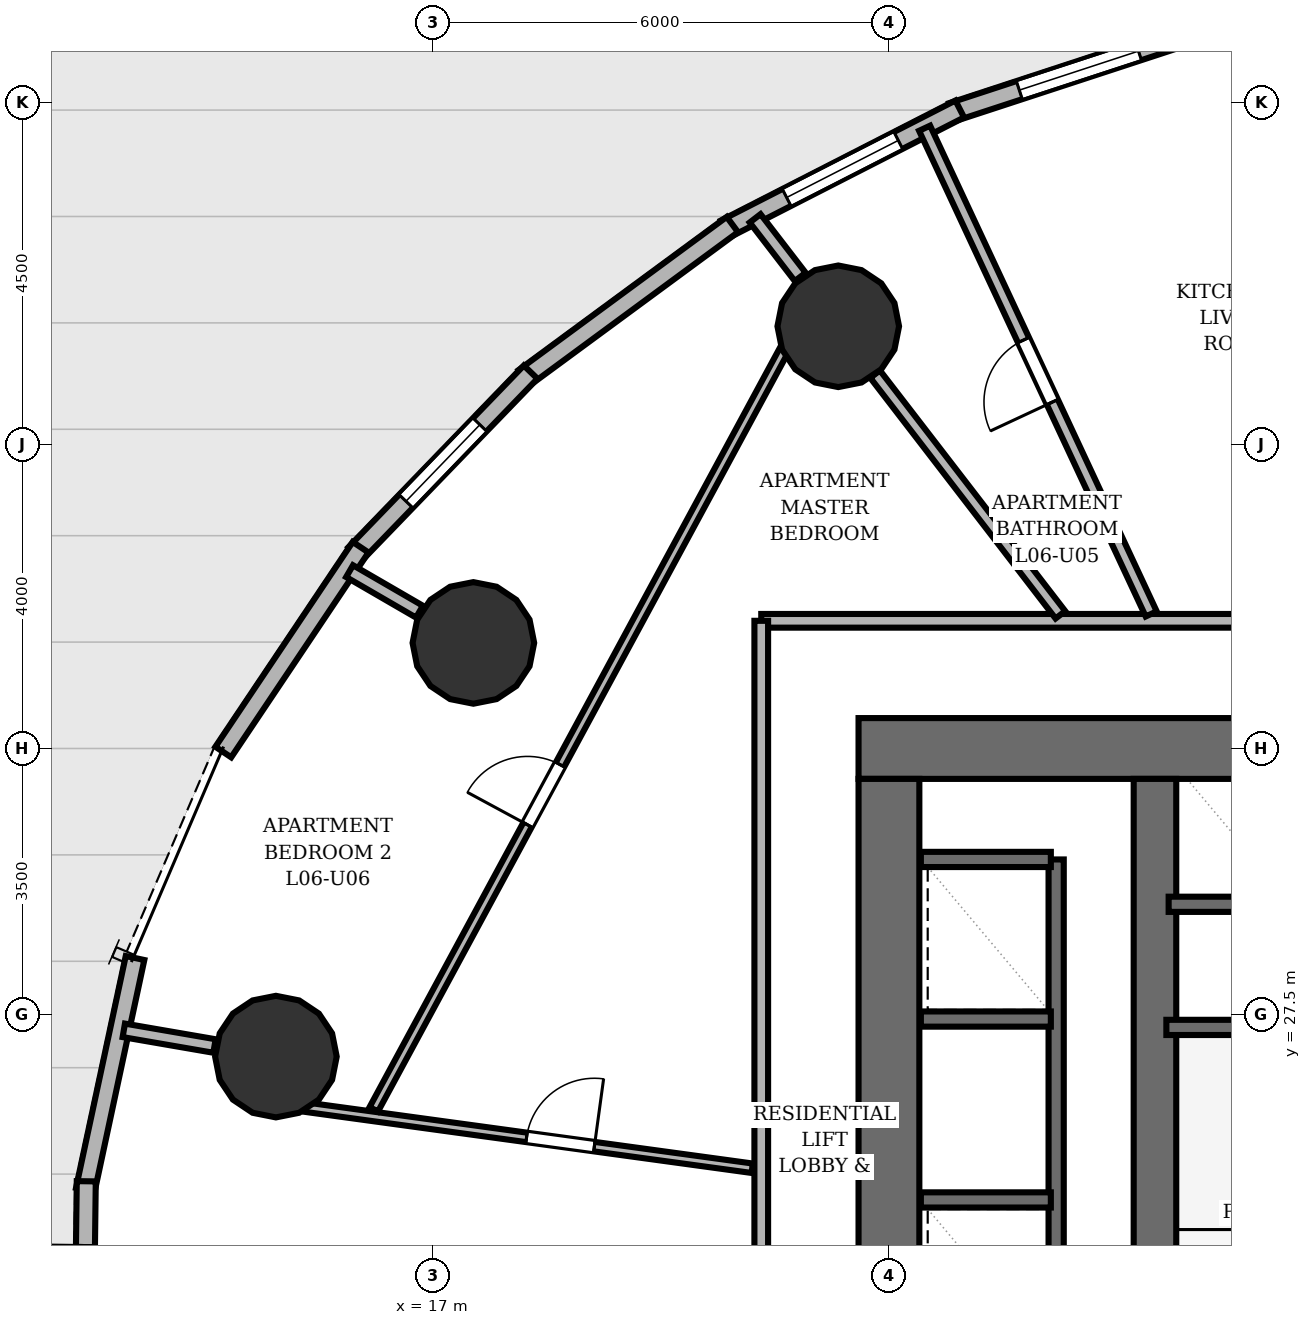
"""IFC4 building model, lengths in metres.
Left out: names, types, materials, properties, quantities, classifications, styles, units other than length and angle.
Written with IfcOpenShell. Run it as: python <this file> out.ifc"""

import sys

from ifc_helpers import new_model, si_unit, direction, frame, frame_2d, origin, origin_2d, place, context, subcontext, project, spatial, rectangle, circle, extrude, element, fill, save


model = new_model("IFC4")
c1 = context("Model", 3, precision=1e-05, world=origin(), true_north=direction((0.0, 1.0)))
c2 = subcontext(c1, "Body", "Model", "MODEL_VIEW")
j1 = project(units=[si_unit("LENGTHUNIT", "METRE"), si_unit("PLANEANGLEUNIT", "RADIAN")], contexts=[c1])
p1 = place(None, origin())
s1 = spatial("IfcSite", under=j1, at=p1, CompositionType="ELEMENT")
p2 = place(p1, origin())
s2 = spatial("IfcBuilding", under=s1, at=p2, CompositionType="ELEMENT")
p3 = place(p2, frame((0.0, 0.0, 24.8)))
s3 = spatial("IfcBuildingStorey", under=s2, at=p3, CompositionType="ELEMENT", Elevation=24.8)
p4 = place(p3, frame((22.6, 31.0, 0.0), z_axis=(0.0, 0.0, 1.0), x_axis=(1.0, 0.0, 0.0)))
e1 = element("IfcWall", 1, at=p4, inside=s3, PredefinedType="SHEAR", context=c2, shape_type="SweptSolid", body=[
    extrude(rectangle(XDim=18.8, YDim=0.8, at=frame_2d((9.4, 0.0))), origin(), (0.0, 0.0, 1.0), 3.2),
])
p5 = place(p4, frame((11.8, 0.0, 0.0)))
e2 = element("IfcOpeningElement", 2, at=p5, cuts=e1, PredefinedType="OPENING", context=c2, shape_type="SweptSolid", body=[
    extrude(rectangle(XDim=1.1, YDim=2.15, at=frame_2d((0.55, 1.075))), frame((0.0, 0.41, 0.0), z_axis=(0.0, -1.0, 0.0), x_axis=(1.0, 0.0, 0.0)), (0.0, 0.0, 1.0), 0.82),
])
p6 = place(p3, frame((23.0, 17.4, 0.0), z_axis=(0.0, 0.0, 1.0), x_axis=(0.0, 1.0, 0.0)))
e3 = element("IfcWall", 3, at=p6, inside=s3, PredefinedType="SHEAR", context=c2, shape_type="SweptSolid", body=[
    extrude(rectangle(XDim=13.2, YDim=0.8, at=frame_2d((6.6, 0.0))), origin(), (0.0, 0.0, 1.0), 3.2),
])
p7 = place(p3, frame((26.5, 17.4, 0.0), z_axis=(0.0, 0.0, 1.0), x_axis=(0.0, 1.0, 0.0)))
e4 = element("IfcWall", 4, at=p7, inside=s3, PredefinedType="SHEAR", context=c2, shape_type="SweptSolid", body=[
    extrude(rectangle(XDim=13.2, YDim=0.56, at=frame_2d((6.6, 0.0))), origin(), (0.0, 0.0, 1.0), 3.2),
])
for number, where, z_axis, x_axis in (
    (5, (22.333, 36.555, 0.0), (0.0, 0.0, 1.0), (1.0, 0.0, 0.0)),
    (6, (17.532, 32.389, 0.0), (0.0, 0.0, 1.0), (1.0, 0.0, 0.0)),
    (7, (14.934, 26.946, 0.0), (0.0, 0.0, 1.0), (1.0, 0.0, 0.0)),
):
    element("IfcColumn", number, at=place(p3, frame(where, z_axis=z_axis, x_axis=x_axis)), inside=s3, PredefinedType="COLUMN", context=c2, shape_type="SweptSolid", body=[
        extrude(circle(Radius=0.8, at=origin_2d()), origin(), (0.0, 0.0, 1.0), 3.2),
    ])
p8 = place(p3, frame((23.831, 39.373, 0.0), z_axis=(0.0, 0.0, 1.0), x_axis=(0.950290237418, 0.311365484066, 0.0)))
e8 = element("IfcWall", 8, at=p8, inside=s3, PredefinedType="SOLIDWALL", context=c2, shape_type="SweptSolid", body=[
    extrude(rectangle(XDim=3.513, YDim=0.25, at=frame_2d((1.756, 0.0))), origin(), (0.0, 0.0, 1.0), 2.96),
])
p9 = place(p8, frame((0.931, 0.0, 0.85)))
e9 = element("IfcOpeningElement", 9, at=p9, cuts=e8, PredefinedType="OPENING", context=c2, shape_type="SweptSolid", body=[
    extrude(rectangle(XDim=1.65, YDim=1.55, at=frame_2d((0.825, 0.775))), frame((0.0, 0.135, 0.0), z_axis=(0.0, -1.0, 0.0), x_axis=(1.0, 0.0, 0.0)), (0.0, 0.0, 1.0), 0.27),
])
p10 = place(p3, frame((20.847, 37.836, 0.0), z_axis=(0.0, 0.0, 1.0), x_axis=(0.890260122421, 0.455452428281, 0.0)))
e10 = element("IfcWall", 10, at=p10, inside=s3, PredefinedType="SOLIDWALL", context=c2, shape_type="SweptSolid", body=[
    extrude(rectangle(XDim=3.465, YDim=0.25, at=frame_2d((1.732, 0.0))), origin(), (0.0, 0.0, 1.0), 2.96),
])
p11 = place(p10, frame((0.907, 0.0, 0.85)))
e11 = element("IfcOpeningElement", 11, at=p11, cuts=e10, PredefinedType="OPENING", context=c2, shape_type="SweptSolid", body=[
    extrude(rectangle(XDim=1.65, YDim=1.55, at=frame_2d((0.825, 0.775))), frame((0.0, 0.135, 0.0), z_axis=(0.0, -1.0, 0.0), x_axis=(1.0, 0.0, 0.0)), (0.0, 0.0, 1.0), 0.27),
])
p12 = place(p3, frame((18.202, 35.88, 0.0), z_axis=(0.0, 0.0, 1.0), x_axis=(0.805405938507, 0.592723606935, 0.0)))
e12 = element("IfcWall", 12, at=p12, inside=s3, PredefinedType="SOLIDWALL", context=c2, shape_type="SweptSolid", body=[
    extrude(rectangle(XDim=3.399, YDim=0.25, at=frame_2d((1.699, 0.0))), origin(), (0.0, 0.0, 1.0), 2.96),
])
p13 = place(p3, frame((15.979, 33.562, 0.0), z_axis=(0.0, 0.0, 1.0), x_axis=(0.694392538781, 0.719596416115, 0.0)))
e13 = element("IfcWall", 13, at=p13, inside=s3, PredefinedType="SOLIDWALL", context=c2, shape_type="SweptSolid", body=[
    extrude(rectangle(XDim=3.323, YDim=0.25, at=frame_2d((1.661, 0.0))), origin(), (0.0, 0.0, 1.0), 2.96),
])
p14 = place(p13, frame((0.961, 0.0, 0.85)))
e14 = element("IfcOpeningElement", 14, at=p14, cuts=e13, PredefinedType="OPENING", context=c2, shape_type="SweptSolid", body=[
    extrude(rectangle(XDim=1.4, YDim=1.55, at=frame_2d((0.7, 0.775))), frame((0.0, 0.135, 0.0), z_axis=(0.0, -1.0, 0.0), x_axis=(1.0, 0.0, 0.0)), (0.0, 0.0, 1.0), 0.27),
])
p15 = place(p3, frame((14.242, 30.953, 0.0), z_axis=(0.0, 0.0, 1.0), x_axis=(0.556764929833, 0.83067009872, 0.0)))
e15 = element("IfcWall", 15, at=p15, inside=s3, PredefinedType="SOLIDWALL", context=c2, shape_type="SweptSolid", body=[
    extrude(rectangle(XDim=3.244, YDim=0.25, at=frame_2d((1.622, 0.0))), origin(), (0.0, 0.0, 1.0), 2.96),
])
p16 = place(p3, frame((12.427, 25.192, 0.0), z_axis=(0.0, 0.0, 1.0), x_axis=(0.209668000253, 0.977772637002, 0.0)))
e16 = element("IfcWall", 16, at=p16, inside=s3, PredefinedType="SOLIDWALL", context=c2, shape_type="SweptSolid", body=[
    extrude(rectangle(XDim=3.121, YDim=0.25, at=frame_2d((1.56, 0.0))), origin(), (0.0, 0.0, 1.0), 2.96),
])
p17 = place(p3, frame((12.401, 22.214, 0.0), z_axis=(0.0, 0.0, 1.0), x_axis=(0.012397373015, 0.999923149618, 0.0)))
e17 = element("IfcWall", 17, at=p17, inside=s3, PredefinedType="SOLIDWALL", context=c2, shape_type="SweptSolid", body=[
    extrude(rectangle(XDim=3.092, YDim=0.25, at=frame_2d((1.546, 0.0))), origin(), (0.0, 0.0, 1.0), 2.96),
])
p18 = place(p17, frame((0.846, 0.0, 0.0)))
e18 = element("IfcOpeningElement", 18, at=p18, cuts=e17, PredefinedType="OPENING", context=c2, shape_type="SweptSolid", body=[
    extrude(rectangle(XDim=1.4, YDim=2.2, at=frame_2d((0.7, 1.1))), frame((0.0, 0.135, 0.0), z_axis=(0.0, -1.0, 0.0), x_axis=(1.0, 0.0, 0.0)), (0.0, 0.0, 1.0), 0.27),
])
p19 = place(p3, frame((26.65, 27.33, 0.0), z_axis=(0.0, 0.0, 1.0), x_axis=(1.0, 0.0, 0.0)))
e19 = element("IfcWall", 19, at=p19, inside=s3, PredefinedType="SHEAR", context=c2, shape_type="SweptSolid", body=[
    extrude(rectangle(XDim=3.24, YDim=0.2, at=frame_2d((1.62, 0.0))), origin(), (0.0, 0.0, 1.0), 3.2),
])
p20 = place(p3, frame((25.2, 18.46, 0.0), z_axis=(0.0, 0.0, 1.0), x_axis=(0.0, 1.0, 0.0)))
e20 = element("IfcWall", 20, at=p20, inside=s3, PredefinedType="SHEAR", context=c2, shape_type="SweptSolid", body=[
    extrude(rectangle(XDim=11.08, YDim=0.2, at=frame_2d((5.54, 0.0))), origin(), (0.0, 0.0, 1.0), 3.2),
])
for number, where, z_axis, x_axis in (
    (21, (23.42, 29.54, 0.0), (0.0, 0.0, 1.0), (1.0, 0.0, 0.0)),
    (22, (23.42, 25.06, 0.0), (0.0, 0.0, 1.0), (1.0, 0.0, 0.0)),
    (23, (23.42, 27.44, 0.0), (0.0, 0.0, 1.0), (1.0, 0.0, 0.0)),
):
    element("IfcWall", number, at=place(p3, frame(where, z_axis=z_axis, x_axis=x_axis)), inside=s3, PredefinedType="SHEAR", context=c2, shape_type="SweptSolid", body=[
        extrude(rectangle(XDim=1.71, YDim=0.2, at=frame_2d((0.855, 0.0))), origin(), (0.0, 0.0, 1.0), 3.2),
    ])
p21 = place(p3, frame((26.68, 28.95, 0.0), z_axis=(0.0, 0.0, 1.0), x_axis=(1.0, 0.0, 0.0)))
e24 = element("IfcWall", 24, at=p21, inside=s3, PredefinedType="SHEAR", context=c2, shape_type="SweptSolid", body=[
    extrude(rectangle(XDim=5.24, YDim=0.2, at=frame_2d((2.62, 0.0))), origin(), (0.0, 0.0, 1.0), 3.2),
])
p22 = place(p3, frame((21.833, 37.205, 0.0), z_axis=(0.0, 0.0, 1.0), x_axis=(-0.609953343804, 0.792437327732, 0.0)))
e25 = element("IfcWall", 25, at=p22, inside=s3, PredefinedType="PARTITIONING", context=c2, shape_type="SweptSolid", body=[
    extrude(rectangle(XDim=0.973, YDim=0.18, at=frame_2d((0.486, 0.0))), origin(), (0.0, 0.0, 1.0), 2.178),
])
p23 = place(p3, frame((16.823, 32.8, 0.0), z_axis=(0.0, 0.0, 1.0), x_axis=(-0.865001274409, 0.501769663562, 0.0)))
e26 = element("IfcWall", 26, at=p23, inside=s3, PredefinedType="PARTITIONING", context=c2, shape_type="SweptSolid", body=[
    extrude(rectangle(XDim=1.063, YDim=0.18, at=frame_2d((0.531, 0.0))), origin(), (0.0, 0.0, 1.0), 2.178),
])
p24 = place(p3, frame((14.126, 27.085, 0.0), z_axis=(0.0, 0.0, 1.0), x_axis=(-0.985412344637, 0.170183756676, 0.0)))
e27 = element("IfcWall", 27, at=p24, inside=s3, PredefinedType="PARTITIONING", context=c2, shape_type="SweptSolid", body=[
    extrude(rectangle(XDim=1.211, YDim=0.18, at=frame_2d((0.605, 0.0))), origin(), (0.0, 0.0, 1.0), 2.178),
])
p25 = place(p3, frame((21.32, 32.68, 0.0), z_axis=(0.0, 0.0, 1.0), x_axis=(1.0, 0.0, 0.0)))
e28 = element("IfcWall", 28, at=p25, inside=s3, PredefinedType="PARTITIONING", context=c2, shape_type="SweptSolid", body=[
    extrude(rectangle(XDim=8.823, YDim=0.18, at=frame_2d((4.411, 0.0))), origin(), (0.0, 0.0, 1.0), 2.955),
])
p26 = place(p25, frame((6.462, 0.0, 0.0)))
e29 = element("IfcOpeningElement", 29, at=p26, cuts=e28, PredefinedType="OPENING", context=c2, shape_type="SweptSolid", body=[
    extrude(rectangle(XDim=1.05, YDim=2.15, at=frame_2d((0.525, 1.075))), frame((0.0, 0.1, 0.0), z_axis=(0.0, -1.0, 0.0), x_axis=(1.0, 0.0, 0.0)), (0.0, 0.0, 1.0), 0.2),
])
p27 = place(p3, frame((21.32, 22.09, 0.0), z_axis=(0.0, 0.0, 1.0), x_axis=(0.0, 1.0, 0.0)))
e30 = element("IfcWall", 30, at=p27, inside=s3, PredefinedType="PARTITIONING", context=c2, shape_type="SweptSolid", body=[
    extrude(rectangle(XDim=10.59, YDim=0.18, at=frame_2d((5.295, 0.0))), origin(), (0.0, 0.0, 1.0), 2.955),
])
p28 = place(p27, frame((1.17, 0.0, 0.0)))
e31 = element("IfcOpeningElement", 31, at=p28, cuts=e30, PredefinedType="OPENING", context=c2, shape_type="SweptSolid", body=[
    extrude(rectangle(XDim=1.05, YDim=2.15, at=frame_2d((0.525, 1.075))), frame((0.0, 0.1, 0.0), z_axis=(0.0, -1.0, 0.0), x_axis=(1.0, 0.0, 0.0)), (0.0, 0.0, 1.0), 0.2),
])
p29 = place(p3, frame((26.45, 32.771, 0.0), z_axis=(0.0, 0.0, 1.0), x_axis=(-0.422745211231, 0.906248578692, 0.0)))
e32 = element("IfcWall", 32, at=p29, inside=s3, PredefinedType="PLUMBINGWALL", context=c2, shape_type="SweptSolid", body=[
    extrude(rectangle(XDim=7.052, YDim=0.16, at=frame_2d((3.526, 0.0))), origin(), (0.0, 0.0, 1.0), 2.641),
])
p30 = place(p29, frame((3.076, 0.0, 0.0)))
e33 = element("IfcOpeningElement", 33, at=p30, cuts=e32, PredefinedType="OPENING", context=c2, shape_type="SweptSolid", body=[
    extrude(rectangle(XDim=0.9, YDim=2.1, at=frame_2d((0.45, 1.05))), frame((0.0, 0.09, 0.0), z_axis=(0.0, -1.0, 0.0), x_axis=(1.0, 0.0, 0.0)), (0.0, 0.0, 1.0), 0.18),
])
p31 = place(p3, frame((25.256, 32.759, 0.0), z_axis=(0.0, 0.0, 1.0), x_axis=(-0.610097434882, 0.792326397358, 0.0)))
e34 = element("IfcWall", 34, at=p31, inside=s3, PredefinedType="PLUMBINGWALL", context=c2, shape_type="SweptSolid", body=[
    extrude(rectangle(XDim=3.997, YDim=0.16, at=frame_2d((1.998, 0.0))), origin(), (0.0, 0.0, 1.0), 2.178),
])
p32 = place(p3, frame((15.33, 26.28, 0.0), z_axis=(0.0, 0.0, 1.0), x_axis=(0.990775681502, -0.135512172681, 0.0)))
e35 = element("IfcWall", 35, at=p32, inside=s3, PredefinedType="PARTITIONING", context=c2, shape_type="SweptSolid", body=[
    extrude(rectangle(XDim=5.926, YDim=0.125, at=frame_2d((2.963, 0.0))), origin(), (0.0, 0.0, 1.0), 2.955),
])
p33 = place(p32, frame((2.929, 0.0, 0.0)))
e36 = element("IfcOpeningElement", 36, at=p33, cuts=e35, PredefinedType="OPENING", context=c2, shape_type="SweptSolid", body=[
    extrude(rectangle(XDim=0.9, YDim=2.1, at=frame_2d((0.45, 1.05))), frame((0.0, 0.073, 0.0), z_axis=(0.0, -1.0, 0.0), x_axis=(1.0, 0.0, 0.0)), (0.0, 0.0, 1.0), 0.145),
])
p34 = place(p3, frame((16.222, 26.252, 0.0), z_axis=(0.0, 0.0, 1.0), x_axis=(0.475374660533, 0.879783457519, 0.0)))
e37 = element("IfcWall", 37, at=p34, inside=s3, PredefinedType="PARTITIONING", context=c2, shape_type="SweptSolid", body=[
    extrude(rectangle(XDim=11.37, YDim=0.125, at=frame_2d((5.685, 0.0))), origin(), (0.0, 0.0, 1.0), 2.328),
])
p35 = place(p34, frame((4.255, 0.0, 0.0)))
e38 = element("IfcOpeningElement", 38, at=p35, cuts=e37, PredefinedType="OPENING", context=c2, shape_type="SweptSolid", body=[
    extrude(rectangle(XDim=0.9, YDim=2.1, at=frame_2d((0.45, 1.05))), frame((0.0, 0.073, 0.0), z_axis=(0.0, -1.0, 0.0), x_axis=(1.0, 0.0, 0.0)), (0.0, 0.0, 1.0), 0.145),
])
p36 = place(p9, origin())
e39 = element("IfcWindow", 39, at=p36, inside=s3, PartitioningType="SINGLE_PANEL", PredefinedType="WINDOW", context=c2, shape_type="SweptSolid", body=[
    extrude(rectangle(XDim=1.65, YDim=1.55, at=frame_2d((0.825, 0.775))), frame((0.0, 0.03, 0.0), z_axis=(0.0, -1.0, 0.0), x_axis=(1.0, 0.0, 0.0)), (0.0, 0.0, 1.0), 0.06),
])
fill(e9, e39)
p37 = place(p11, origin())
e40 = element("IfcWindow", 40, at=p37, inside=s3, PartitioningType="SINGLE_PANEL", PredefinedType="WINDOW", context=c2, shape_type="SweptSolid", body=[
    extrude(rectangle(XDim=1.65, YDim=1.55, at=frame_2d((0.825, 0.775))), frame((0.0, 0.03, 0.0), z_axis=(0.0, -1.0, 0.0), x_axis=(1.0, 0.0, 0.0)), (0.0, 0.0, 1.0), 0.06),
])
fill(e11, e40)
p38 = place(p14, origin())
e41 = element("IfcWindow", 41, at=p38, inside=s3, PartitioningType="SINGLE_PANEL", PredefinedType="WINDOW", context=c2, shape_type="SweptSolid", body=[
    extrude(rectangle(XDim=1.4, YDim=1.55, at=frame_2d((0.7, 0.775))), frame((0.0, 0.03, 0.0), z_axis=(0.0, -1.0, 0.0), x_axis=(1.0, 0.0, 0.0)), (0.0, 0.0, 1.0), 0.06),
])
fill(e14, e41)
p39 = place(p30, origin())
e42 = element("IfcDoor", 42, at=p39, inside=s3, OperationType="SINGLE_SWING_LEFT", PredefinedType="DOOR", context=c2, shape_type="SweptSolid", body=[
    extrude(rectangle(XDim=0.9, YDim=2.1, at=frame_2d((0.45, 1.05))), frame((0.0, 0.025, 0.0), z_axis=(0.0, -1.0, 0.0), x_axis=(1.0, 0.0, 0.0)), (0.0, 0.0, 1.0), 0.05),
])
fill(e33, e42)
p40 = place(p33, origin())
e43 = element("IfcDoor", 43, at=p40, inside=s3, OperationType="SINGLE_SWING_RIGHT", PredefinedType="DOOR", context=c2, shape_type="SweptSolid", body=[
    extrude(rectangle(XDim=0.9, YDim=2.1, at=frame_2d((0.45, 1.05))), frame((0.0, 0.025, 0.0), z_axis=(0.0, -1.0, 0.0), x_axis=(1.0, 0.0, 0.0)), (0.0, 0.0, 1.0), 0.05),
])
fill(e36, e43)
p41 = place(p35, origin())
e44 = element("IfcDoor", 44, at=p41, inside=s3, OperationType="SINGLE_SWING_LEFT", PredefinedType="DOOR", context=c2, shape_type="SweptSolid", body=[
    extrude(rectangle(XDim=0.9, YDim=2.1, at=frame_2d((0.45, 1.05))), frame((0.0, 0.025, 0.0), z_axis=(0.0, -1.0, 0.0), x_axis=(1.0, 0.0, 0.0)), (0.0, 0.0, 1.0), 0.05),
])
fill(e38, e44)
save(model, sys.argv[1])
